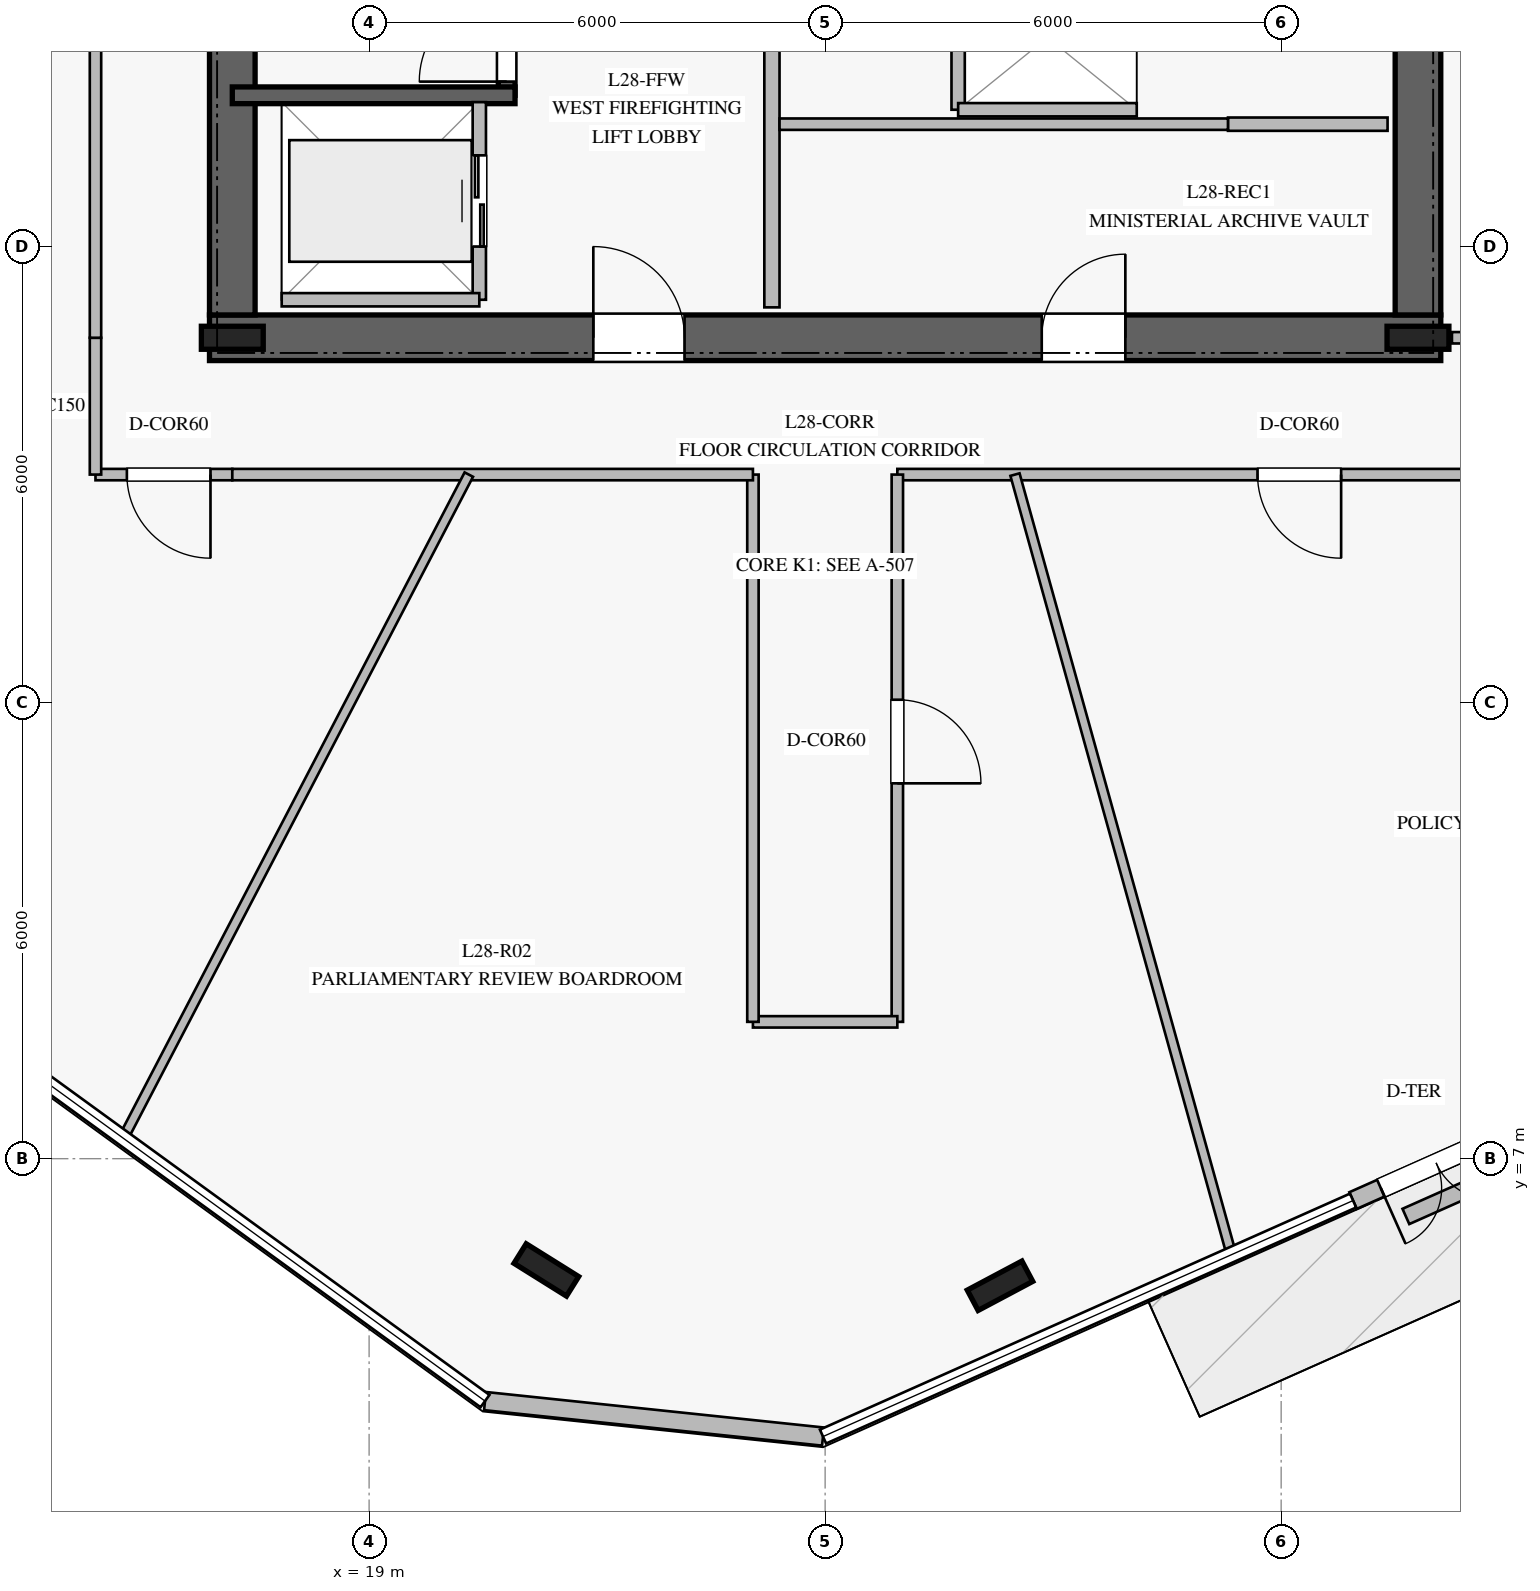
"""IFC4 building model, lengths in metres.
Left out: names, types, materials, properties, quantities, classifications, styles, units other than length and angle.
Written with IfcOpenShell. Run it as: python <this file> out.ifc"""

import sys

from ifc_helpers import new_model, si_unit, direction, frame, frame_2d, origin, origin_2d, place, context, subcontext, project, spatial, rectangle, i_section, extrude, element, fill, save


model = new_model("IFC4")
c1 = context("Model", 3, precision=1e-05, world=origin(), true_north=direction((0.0, 1.0)))
c2 = subcontext(c1, "Body", "Model", "MODEL_VIEW")
j1 = project(units=[si_unit("LENGTHUNIT", "METRE"), si_unit("PLANEANGLEUNIT", "RADIAN")], contexts=[c1])
p1 = place(None, origin())
s1 = spatial("IfcSite", under=j1, at=p1, CompositionType="ELEMENT")
p2 = place(p1, origin())
s2 = spatial("IfcBuilding", under=s1, at=p2, CompositionType="ELEMENT")
p3 = place(p2, frame((0.0, 0.0, 118.4)))
s3 = spatial("IfcBuildingStorey", under=s2, at=p3, CompositionType="ELEMENT", Elevation=118.4)
p4 = place(p3, frame((16.9, 17.8, 0.0), z_axis=(0.0, 0.0, 1.0), x_axis=(1.0, 0.0, 0.0)))
e1 = element("IfcWall", 1, at=p4, inside=s3, PredefinedType="SHEAR", context=c2, shape_type="SweptSolid", body=[
    extrude(rectangle(XDim=16.2, YDim=0.6, at=frame_2d((8.1, 0.0))), origin(), (0.0, 0.0, 1.0), 3.76),
])
p5 = place(p4, frame((5.05, 0.0, 0.0)))
e2 = element("IfcOpeningElement", 2, at=p5, cuts=e1, PredefinedType="OPENING", context=c2, shape_type="SweptSolid", body=[
    extrude(rectangle(XDim=1.2, YDim=2.25, at=frame_2d((0.6, 1.125))), frame((0.0, 0.31, 0.0), z_axis=(0.0, -1.0, 0.0), x_axis=(1.0, 0.0, 0.0)), (0.0, 0.0, 1.0), 0.62),
])
p6 = place(p4, frame((10.95, 0.0, 0.0)))
e3 = element("IfcOpeningElement", 3, at=p6, cuts=e1, PredefinedType="OPENING", context=c2, shape_type="SweptSolid", body=[
    extrude(rectangle(XDim=1.1, YDim=2.2, at=frame_2d((0.55, 1.1))), frame((0.0, 0.31, 0.0), z_axis=(0.0, -1.0, 0.0), x_axis=(1.0, 0.0, 0.0)), (0.0, 0.0, 1.0), 0.62),
])
p7 = place(p3, frame((17.2, 31.9, 0.0), z_axis=(0.0, 0.0, 1.0), x_axis=(0.0, -1.0, 0.0)))
e4 = element("IfcWall", 4, at=p7, inside=s3, PredefinedType="SHEAR", context=c2, shape_type="SweptSolid", body=[
    extrude(rectangle(XDim=13.8, YDim=0.6, at=frame_2d((6.9, 0.0))), origin(), (0.0, 0.0, 1.0), 3.76),
])
p8 = place(p7, frame((2.05, 0.0, 0.0)))
e5 = element("IfcOpeningElement", 5, at=p8, cuts=e4, PredefinedType="OPENING", context=c2, shape_type="SweptSolid", body=[
    extrude(rectangle(XDim=1.5, YDim=2.2, at=frame_2d((0.75, 1.1))), frame((0.0, 0.31, 0.0), z_axis=(0.0, -1.0, 0.0), x_axis=(1.0, 0.0, 0.0)), (0.0, 0.0, 1.0), 0.62),
])
p9 = place(p3, frame((32.8, 18.1, 0.0), z_axis=(0.0, 0.0, 1.0), x_axis=(0.0, 1.0, 0.0)))
e6 = element("IfcWall", 6, at=p9, inside=s3, PredefinedType="SHEAR", context=c2, shape_type="SweptSolid", body=[
    extrude(rectangle(XDim=13.8, YDim=0.6, at=frame_2d((6.9, 0.0))), origin(), (0.0, 0.0, 1.0), 3.76),
])
for number, where, z_axis, x_axis in (
    (7, (17.2, 17.8, 0.0), (0.0, 0.0, 1.0), (1.0, 0.0, 0.0)),
    (8, (32.8, 17.8, 0.0), (0.0, 0.0, 1.0), (1.0, 0.0, 0.0)),
):
    element("IfcColumn", number, at=place(p3, frame(where, z_axis=z_axis, x_axis=x_axis)), inside=s3, PredefinedType="COLUMN", context=c2, shape_type="SweptSolid", body=[
        extrude(i_section(OverallWidth=0.303, OverallDepth=0.814, WebThickness=0.021, FlangeThickness=0.04, at=origin_2d()), origin(), (0.0, 0.0, 1.0), 4.0),
    ])
p10 = place(p3, frame((20.81, 20.99, 0.0), z_axis=(0.0, 0.0, 1.0), x_axis=(0.0, 1.0, 0.0)))
e9 = element("IfcWall", 9, at=p10, inside=s3, PredefinedType="SOLIDWALL", context=c2, shape_type="SweptSolid", body=[
    extrude(rectangle(XDim=7.22, YDim=0.22, at=frame_2d((3.61, 0.0))), origin(), (0.0, 0.0, 1.0), 3.76),
])
p11 = place(p10, frame((0.18, 0.0, 0.0)))
e10 = element("IfcOpeningElement", 10, at=p11, cuts=e9, PredefinedType="OPENING", context=c2, shape_type="SweptSolid", body=[
    extrude(rectangle(XDim=1.15, YDim=2.2, at=frame_2d((0.575, 1.1))), frame((0.0, 0.12, 0.0), z_axis=(0.0, -1.0, 0.0), x_axis=(1.0, 0.0, 0.0)), (0.0, 0.0, 1.0), 0.24),
])
p12 = place(p3, frame((17.2, 20.99, 0.0), z_axis=(0.0, 0.0, 1.0), x_axis=(1.0, 0.0, 0.0)))
e11 = element("IfcWall", 11, at=p12, inside=s3, PredefinedType="SOLIDWALL", context=c2, shape_type="SweptSolid", body=[
    extrude(rectangle(XDim=3.72, YDim=0.22, at=frame_2d((1.86, 0.0))), origin(), (0.0, 0.0, 1.0), 3.76),
])
for number, where, z_axis, x_axis in (
    (12, (21.332, 5.536, 0.0), (0.0, 0.0, 1.0), (-0.848, 0.53, 0.0)),
    (13, (27.301, 5.328, 0.0), (0.0, 0.0, 1.0), (0.883, 0.469, 0.0)),
):
    element("IfcColumn", number, at=place(p3, frame(where, z_axis=z_axis, x_axis=x_axis)), inside=s3, PredefinedType="COLUMN", context=c2, shape_type="SweptSolid", body=[
        extrude(i_section(OverallWidth=0.303, OverallDepth=0.814, WebThickness=0.021, FlangeThickness=0.04, at=origin_2d()), origin(), (0.0, 0.0, 1.0), 4.0),
    ])
p13 = place(p3, frame((20.525, 3.811, 0.0), z_axis=(0.0, 0.0, 1.0), x_axis=(0.994530256506, -0.104448881729, 0.0)))
e14 = element("IfcWall", 14, at=p13, inside=s3, PredefinedType="STANDARD", context=c2, shape_type="SweptSolid", body=[
    extrude(rectangle(XDim=4.471, YDim=0.24, at=frame_2d((2.236, 0.0))), origin(), (0.0, 0.0, 1.0), 3.76),
])
p14 = place(p3, frame((31.946, 6.449, 0.0), z_axis=(0.0, 0.0, 1.0), x_axis=(0.91351759636, 0.406799214775, 0.0)))
e15 = element("IfcWall", 15, at=p14, inside=s3, PredefinedType="STANDARD", context=c2, shape_type="SweptSolid", body=[
    extrude(rectangle(XDim=2.399, YDim=0.24, at=frame_2d((1.2, 0.0))), origin(), (0.0, 0.0, 1.0), 3.76),
])
p15 = place(p14, frame((0.4, 0.0, 0.0)))
e16 = element("IfcOpeningElement", 16, at=p15, cuts=e15, PredefinedType="OPENING", context=c2, shape_type="SweptSolid", body=[
    extrude(rectangle(XDim=1.6, YDim=2.25, at=frame_2d((0.8, 1.125))), frame((0.0, 0.13, 0.0), z_axis=(0.0, -1.0, 0.0), x_axis=(1.0, 0.0, 0.0)), (0.0, 0.0, 1.0), 0.26),
])
p16 = place(p3, frame((32.641, 6.24, 0.0), z_axis=(0.0, 0.0, 1.0), x_axis=(0.913788315317, 0.406190736957, 0.0)))
e17 = element("IfcWall", 17, at=p16, inside=s3, PredefinedType="USERDEFINED", context=c2, shape_type="SweptSolid", body=[
    extrude(rectangle(XDim=1.3, YDim=0.22, at=frame_2d((0.65, 0.0))), origin(), (0.0, 0.0, 1.0), 0.4),
])
p17 = place(p3, frame((24.3, 18.2, 0.0), z_axis=(0.0, 0.0, 1.0), x_axis=(0.0, 1.0, 0.0)))
e18 = element("IfcWall", 18, at=p17, inside=s3, PredefinedType="PARTITIONING", context=c2, shape_type="SweptSolid", body=[
    extrude(rectangle(XDim=5.15, YDim=0.2, at=frame_2d((2.575, 0.0))), origin(), (0.0, 0.0, 1.0), 3.76),
])
p18 = place(p3, frame((30.3, 20.61, 0.0), z_axis=(0.0, 0.0, 1.0), x_axis=(1.0, 0.0, 0.0)))
e19 = element("IfcWall", 19, at=p18, inside=s3, PredefinedType="PARTITIONING", context=c2, shape_type="SweptSolid", body=[
    extrude(rectangle(XDim=2.1, YDim=0.175, at=frame_2d((1.05, 0.0))), origin(), (0.0, 0.0, 1.0), 3.76),
])
p19 = place(p3, frame((24.4, 20.61, 0.0), z_axis=(0.0, 0.0, 1.0), x_axis=(1.0, 0.0, 0.0)))
e20 = element("IfcWall", 20, at=p19, inside=s3, PredefinedType="PARTITIONING", context=c2, shape_type="SweptSolid", body=[
    extrude(rectangle(XDim=5.9, YDim=0.15, at=frame_2d((2.95, 0.0))), origin(), (0.0, 0.0, 1.0), 3.76),
])
p20 = place(p3, frame((26.75, 20.8, 0.0), z_axis=(0.0, 0.0, 1.0), x_axis=(0.0, 1.0, 0.0)))
e21 = element("IfcWall", 21, at=p20, inside=s3, PredefinedType="PARTITIONING", context=c2, shape_type="SweptSolid", body=[
    extrude(rectangle(XDim=1.9, YDim=0.175, at=frame_2d((0.95, 0.0))), origin(), (0.0, 0.0, 1.0), 3.76),
])
p21 = place(p3, frame((26.75, 20.8, 0.0), z_axis=(0.0, 0.0, 1.0), x_axis=(1.0, 0.0, 0.0)))
e22 = element("IfcWall", 22, at=p21, inside=s3, PredefinedType="PARTITIONING", context=c2, shape_type="SweptSolid", body=[
    extrude(rectangle(XDim=2.35, YDim=0.175, at=frame_2d((1.175, 0.0))), origin(), (0.0, 0.0, 1.0), 3.76),
])
p22 = place(p3, frame((20.45, 18.3, 0.0), z_axis=(0.0, 0.0, 1.0), x_axis=(0.0, 1.0, 0.0)))
e23 = element("IfcWall", 23, at=p22, inside=s3, PredefinedType="PARTITIONING", context=c2, shape_type="SweptSolid", body=[
    extrude(rectangle(XDim=2.6, YDim=0.175, at=frame_2d((1.3, 0.0))), origin(), (0.0, 0.0, 1.0), 3.76),
])
p23 = place(p22, frame((0.7, 0.0, 0.0)))
e24 = element("IfcOpeningElement", 24, at=p23, cuts=e23, PredefinedType="OPENING", context=c2, shape_type="SweptSolid", body=[
    extrude(rectangle(XDim=1.2, YDim=2.2, at=frame_2d((0.6, 1.1))), frame((0.0, 0.098, 0.0), z_axis=(0.0, -1.0, 0.0), x_axis=(1.0, 0.0, 0.0)), (0.0, 0.0, 1.0), 0.195),
])
p24 = place(p3, frame((17.85, 18.3, 0.0), z_axis=(0.0, 0.0, 1.0), x_axis=(1.0, 0.0, 0.0)))
e25 = element("IfcWall", 25, at=p24, inside=s3, PredefinedType="PARTITIONING", context=c2, shape_type="SweptSolid", body=[
    extrude(rectangle(XDim=2.6, YDim=0.175, at=frame_2d((1.3, 0.0))), origin(), (0.0, 0.0, 1.0), 3.76),
])
p25 = place(p3, frame((17.2, 16.0, 0.0), z_axis=(0.0, 0.0, 1.0), x_axis=(-1.0, 0.0, 0.0)))
e26 = element("IfcWall", 26, at=p25, inside=s3, PredefinedType="PARTITIONING", context=c2, shape_type="SweptSolid", body=[
    extrude(rectangle(XDim=1.8, YDim=0.15, at=frame_2d((0.9, 0.0))), origin(), (0.0, 0.0, 1.0), 3.36),
])
p26 = place(p25, frame((0.287, 0.0, 0.0)))
e27 = element("IfcOpeningElement", 27, at=p26, cuts=e26, PredefinedType="OPENING", context=c2, shape_type="SweptSolid", body=[
    extrude(rectangle(XDim=1.1, YDim=2.2, at=frame_2d((0.55, 1.1))), frame((0.0, 0.085, 0.0), z_axis=(0.0, -1.0, 0.0), x_axis=(1.0, 0.0, 0.0)), (0.0, 0.0, 1.0), 0.17),
])
p27 = place(p3, frame((15.4, 16.0, 0.0), z_axis=(0.0, 0.0, 1.0), x_axis=(0.0, 1.0, 0.0)))
e28 = element("IfcWall", 28, at=p27, inside=s3, PredefinedType="PARTITIONING", context=c2, shape_type="SweptSolid", body=[
    extrude(rectangle(XDim=1.8, YDim=0.15, at=frame_2d((0.9, 0.0))), origin(), (0.0, 0.0, 1.0), 3.21),
])
p28 = place(p3, frame((15.4, 17.8, 0.0), z_axis=(0.0, 0.0, 1.0), x_axis=(0.0, 1.0, 0.0)))
e29 = element("IfcWall", 29, at=p28, inside=s3, PredefinedType="PARTITIONING", context=c2, shape_type="SweptSolid", body=[
    extrude(rectangle(XDim=6.25, YDim=0.15, at=frame_2d((3.125, 0.0))), origin(), (0.0, 0.0, 1.0), 3.21),
])
p29 = place(p3, frame((33.247, 17.8, 0.0), z_axis=(0.0, 0.0, 1.0), x_axis=(1.0, 0.0, 0.0)))
e30 = element("IfcWall", 30, at=p29, inside=s3, PredefinedType="PARTITIONING", context=c2, shape_type="SweptSolid", body=[
    extrude(rectangle(XDim=7.953, YDim=0.15, at=frame_2d((3.977, 0.0))), origin(), (0.0, 0.0, 1.0), 3.21),
])
p30 = place(p3, frame((41.2, 16.0, 0.0), z_axis=(0.0, 0.0, 1.0), x_axis=(-1.0, 0.0, 0.0)))
e31 = element("IfcWall", 31, at=p30, inside=s3, PredefinedType="PARTITIONING", context=c2, shape_type="SweptSolid", body=[
    extrude(rectangle(XDim=15.25, YDim=0.15, at=frame_2d((7.625, 0.0))), origin(), (0.0, 0.0, 1.0), 3.21),
])
p31 = place(p30, frame((9.411, 0.0, 0.0)))
e32 = element("IfcOpeningElement", 32, at=p31, cuts=e31, PredefinedType="OPENING", context=c2, shape_type="SweptSolid", body=[
    extrude(rectangle(XDim=1.1, YDim=2.2, at=frame_2d((0.55, 1.1))), frame((0.0, 0.085, 0.0), z_axis=(0.0, -1.0, 0.0), x_axis=(1.0, 0.0, 0.0)), (0.0, 0.0, 1.0), 0.17),
])
p32 = place(p3, frame((25.95, 16.0, 0.0), z_axis=(0.0, 0.0, 1.0), x_axis=(0.0, -1.0, 0.0)))
e33 = element("IfcWall", 33, at=p32, inside=s3, PredefinedType="PARTITIONING", context=c2, shape_type="SweptSolid", body=[
    extrude(rectangle(XDim=7.2, YDim=0.15, at=frame_2d((3.6, 0.0))), origin(), (0.0, 0.0, 1.0), 3.36),
])
p33 = place(p32, frame((2.962, 0.0, 0.0)))
e34 = element("IfcOpeningElement", 34, at=p33, cuts=e33, PredefinedType="OPENING", context=c2, shape_type="SweptSolid", body=[
    extrude(rectangle(XDim=1.1, YDim=2.2, at=frame_2d((0.55, 1.1))), frame((0.0, 0.085, 0.0), z_axis=(0.0, -1.0, 0.0), x_axis=(1.0, 0.0, 0.0)), (0.0, 0.0, 1.0), 0.17),
])
p34 = place(p3, frame((25.95, 8.8, 0.0), z_axis=(0.0, 0.0, 1.0), x_axis=(-1.0, 0.0, 0.0)))
e35 = element("IfcWall", 35, at=p34, inside=s3, PredefinedType="PARTITIONING", context=c2, shape_type="SweptSolid", body=[
    extrude(rectangle(XDim=1.9, YDim=0.15, at=frame_2d((0.95, 0.0))), origin(), (0.0, 0.0, 1.0), 3.76),
])
p35 = place(p3, frame((24.05, 8.8, 0.0), z_axis=(0.0, 0.0, 1.0), x_axis=(0.0, 1.0, 0.0)))
e36 = element("IfcWall", 36, at=p35, inside=s3, PredefinedType="PARTITIONING", context=c2, shape_type="SweptSolid", body=[
    extrude(rectangle(XDim=7.2, YDim=0.15, at=frame_2d((3.6, 0.0))), origin(), (0.0, 0.0, 1.0), 3.36),
])
p36 = place(p3, frame((24.05, 16.0, 0.0), z_axis=(0.0, 0.0, 1.0), x_axis=(-1.0, 0.0, 0.0)))
e37 = element("IfcWall", 37, at=p36, inside=s3, PredefinedType="PARTITIONING", context=c2, shape_type="SweptSolid", body=[
    extrude(rectangle(XDim=6.85, YDim=0.15, at=frame_2d((3.425, 0.0))), origin(), (0.0, 0.0, 1.0), 3.21),
])
p37 = place(p3, frame((20.312, 16.0, 0.0), z_axis=(0.0, 0.0, 1.0), x_axis=(-0.46193075433, -0.886915992755, 0.0)))
e38 = element("IfcWall", 38, at=p37, inside=s3, PredefinedType="PARTITIONING", context=c2, shape_type="SweptSolid", body=[
    extrude(rectangle(XDim=9.826, YDim=0.125, at=frame_2d((4.913, 0.0))), origin(), (0.0, 0.0, 1.0), 3.05),
])
p38 = place(p3, frame((27.498, 16.0, 0.0), z_axis=(0.0, 0.0, 1.0), x_axis=(0.267456760759, -0.963569863126, 0.0)))
e39 = element("IfcWall", 39, at=p38, inside=s3, PredefinedType="PARTITIONING", context=c2, shape_type="SweptSolid", body=[
    extrude(rectangle(XDim=10.634, YDim=0.125, at=frame_2d((5.317, 0.0))), origin(), (0.0, 0.0, 1.0), 3.16),
])
p39 = place(p15, frame((1.6, 0.0, 0.0), z_axis=(0.0, 0.0, 1.0), x_axis=(-1.0, 0.0, 0.0)))
e40 = element("IfcDoor", 40, at=p39, inside=s3, OperationType="DOUBLE_DOOR_SINGLE_SWING", PredefinedType="DOOR", context=c2, shape_type="SweptSolid", body=[
    extrude(rectangle(XDim=1.6, YDim=2.25, at=frame_2d((0.8, 1.125))), frame((0.0, 0.025, 0.0), z_axis=(0.0, -1.0, 0.0), x_axis=(1.0, 0.0, 0.0)), (0.0, 0.0, 1.0), 0.05),
])
fill(e16, e40)
p40 = place(p11, origin())
e41 = element("IfcDoor", 41, at=p40, inside=s3, OperationType="SINGLE_SWING_LEFT", PredefinedType="DOOR", context=c2, shape_type="SweptSolid", body=[
    extrude(rectangle(XDim=1.15, YDim=2.2, at=frame_2d((0.575, 1.1))), frame((0.0, 0.025, 0.0), z_axis=(0.0, -1.0, 0.0), x_axis=(1.0, 0.0, 0.0)), (0.0, 0.0, 1.0), 0.05),
])
fill(e10, e41)
p41 = place(p5, origin())
e42 = element("IfcDoor", 42, at=p41, inside=s3, OperationType="SINGLE_SWING_LEFT", PredefinedType="DOOR", context=c2, shape_type="SweptSolid", body=[
    extrude(rectangle(XDim=1.2, YDim=2.25, at=frame_2d((0.6, 1.125))), frame((0.0, 0.025, 0.0), z_axis=(0.0, -1.0, 0.0), x_axis=(1.0, 0.0, 0.0)), (0.0, 0.0, 1.0), 0.05),
])
fill(e2, e42)
p42 = place(p6, origin())
e43 = element("IfcDoor", 43, at=p42, inside=s3, OperationType="SINGLE_SWING_RIGHT", PredefinedType="DOOR", context=c2, shape_type="SweptSolid", body=[
    extrude(rectangle(XDim=1.1, YDim=2.2, at=frame_2d((0.55, 1.1))), frame((0.0, 0.025, 0.0), z_axis=(0.0, -1.0, 0.0), x_axis=(1.0, 0.0, 0.0)), (0.0, 0.0, 1.0), 0.05),
])
fill(e3, e43)
p43 = place(p23, origin())
e44 = element("IfcDoor", 44, at=p43, inside=s3, OperationType="DOUBLE_DOOR_SLIDING", PredefinedType="DOOR", context=c2, shape_type="SweptSolid", body=[
    extrude(rectangle(XDim=1.2, YDim=2.2, at=frame_2d((0.6, 1.1))), frame((0.0, 0.025, 0.0), z_axis=(0.0, -1.0, 0.0), x_axis=(1.0, 0.0, 0.0)), (0.0, 0.0, 1.0), 0.05),
])
fill(e24, e44)
p44 = place(p26, origin())
e45 = element("IfcDoor", 45, at=p44, inside=s3, OperationType="SINGLE_SWING_LEFT", PredefinedType="DOOR", context=c2, shape_type="SweptSolid", body=[
    extrude(rectangle(XDim=1.1, YDim=2.2, at=frame_2d((0.55, 1.1))), frame((0.0, 0.025, 0.0), z_axis=(0.0, -1.0, 0.0), x_axis=(1.0, 0.0, 0.0)), (0.0, 0.0, 1.0), 0.05),
])
fill(e27, e45)
p45 = place(p33, origin())
e46 = element("IfcDoor", 46, at=p45, inside=s3, OperationType="SINGLE_SWING_RIGHT", PredefinedType="DOOR", context=c2, shape_type="SweptSolid", body=[
    extrude(rectangle(XDim=1.1, YDim=2.2, at=frame_2d((0.55, 1.1))), frame((0.0, 0.025, 0.0), z_axis=(0.0, -1.0, 0.0), x_axis=(1.0, 0.0, 0.0)), (0.0, 0.0, 1.0), 0.05),
])
fill(e34, e46)
p46 = place(p31, origin())
e47 = element("IfcDoor", 47, at=p46, inside=s3, OperationType="SINGLE_SWING_LEFT", PredefinedType="DOOR", context=c2, shape_type="SweptSolid", body=[
    extrude(rectangle(XDim=1.1, YDim=2.2, at=frame_2d((0.55, 1.1))), frame((0.0, 0.025, 0.0), z_axis=(0.0, -1.0, 0.0), x_axis=(1.0, 0.0, 0.0)), (0.0, 0.0, 1.0), 0.05),
])
fill(e32, e47)
save(model, sys.argv[1])
